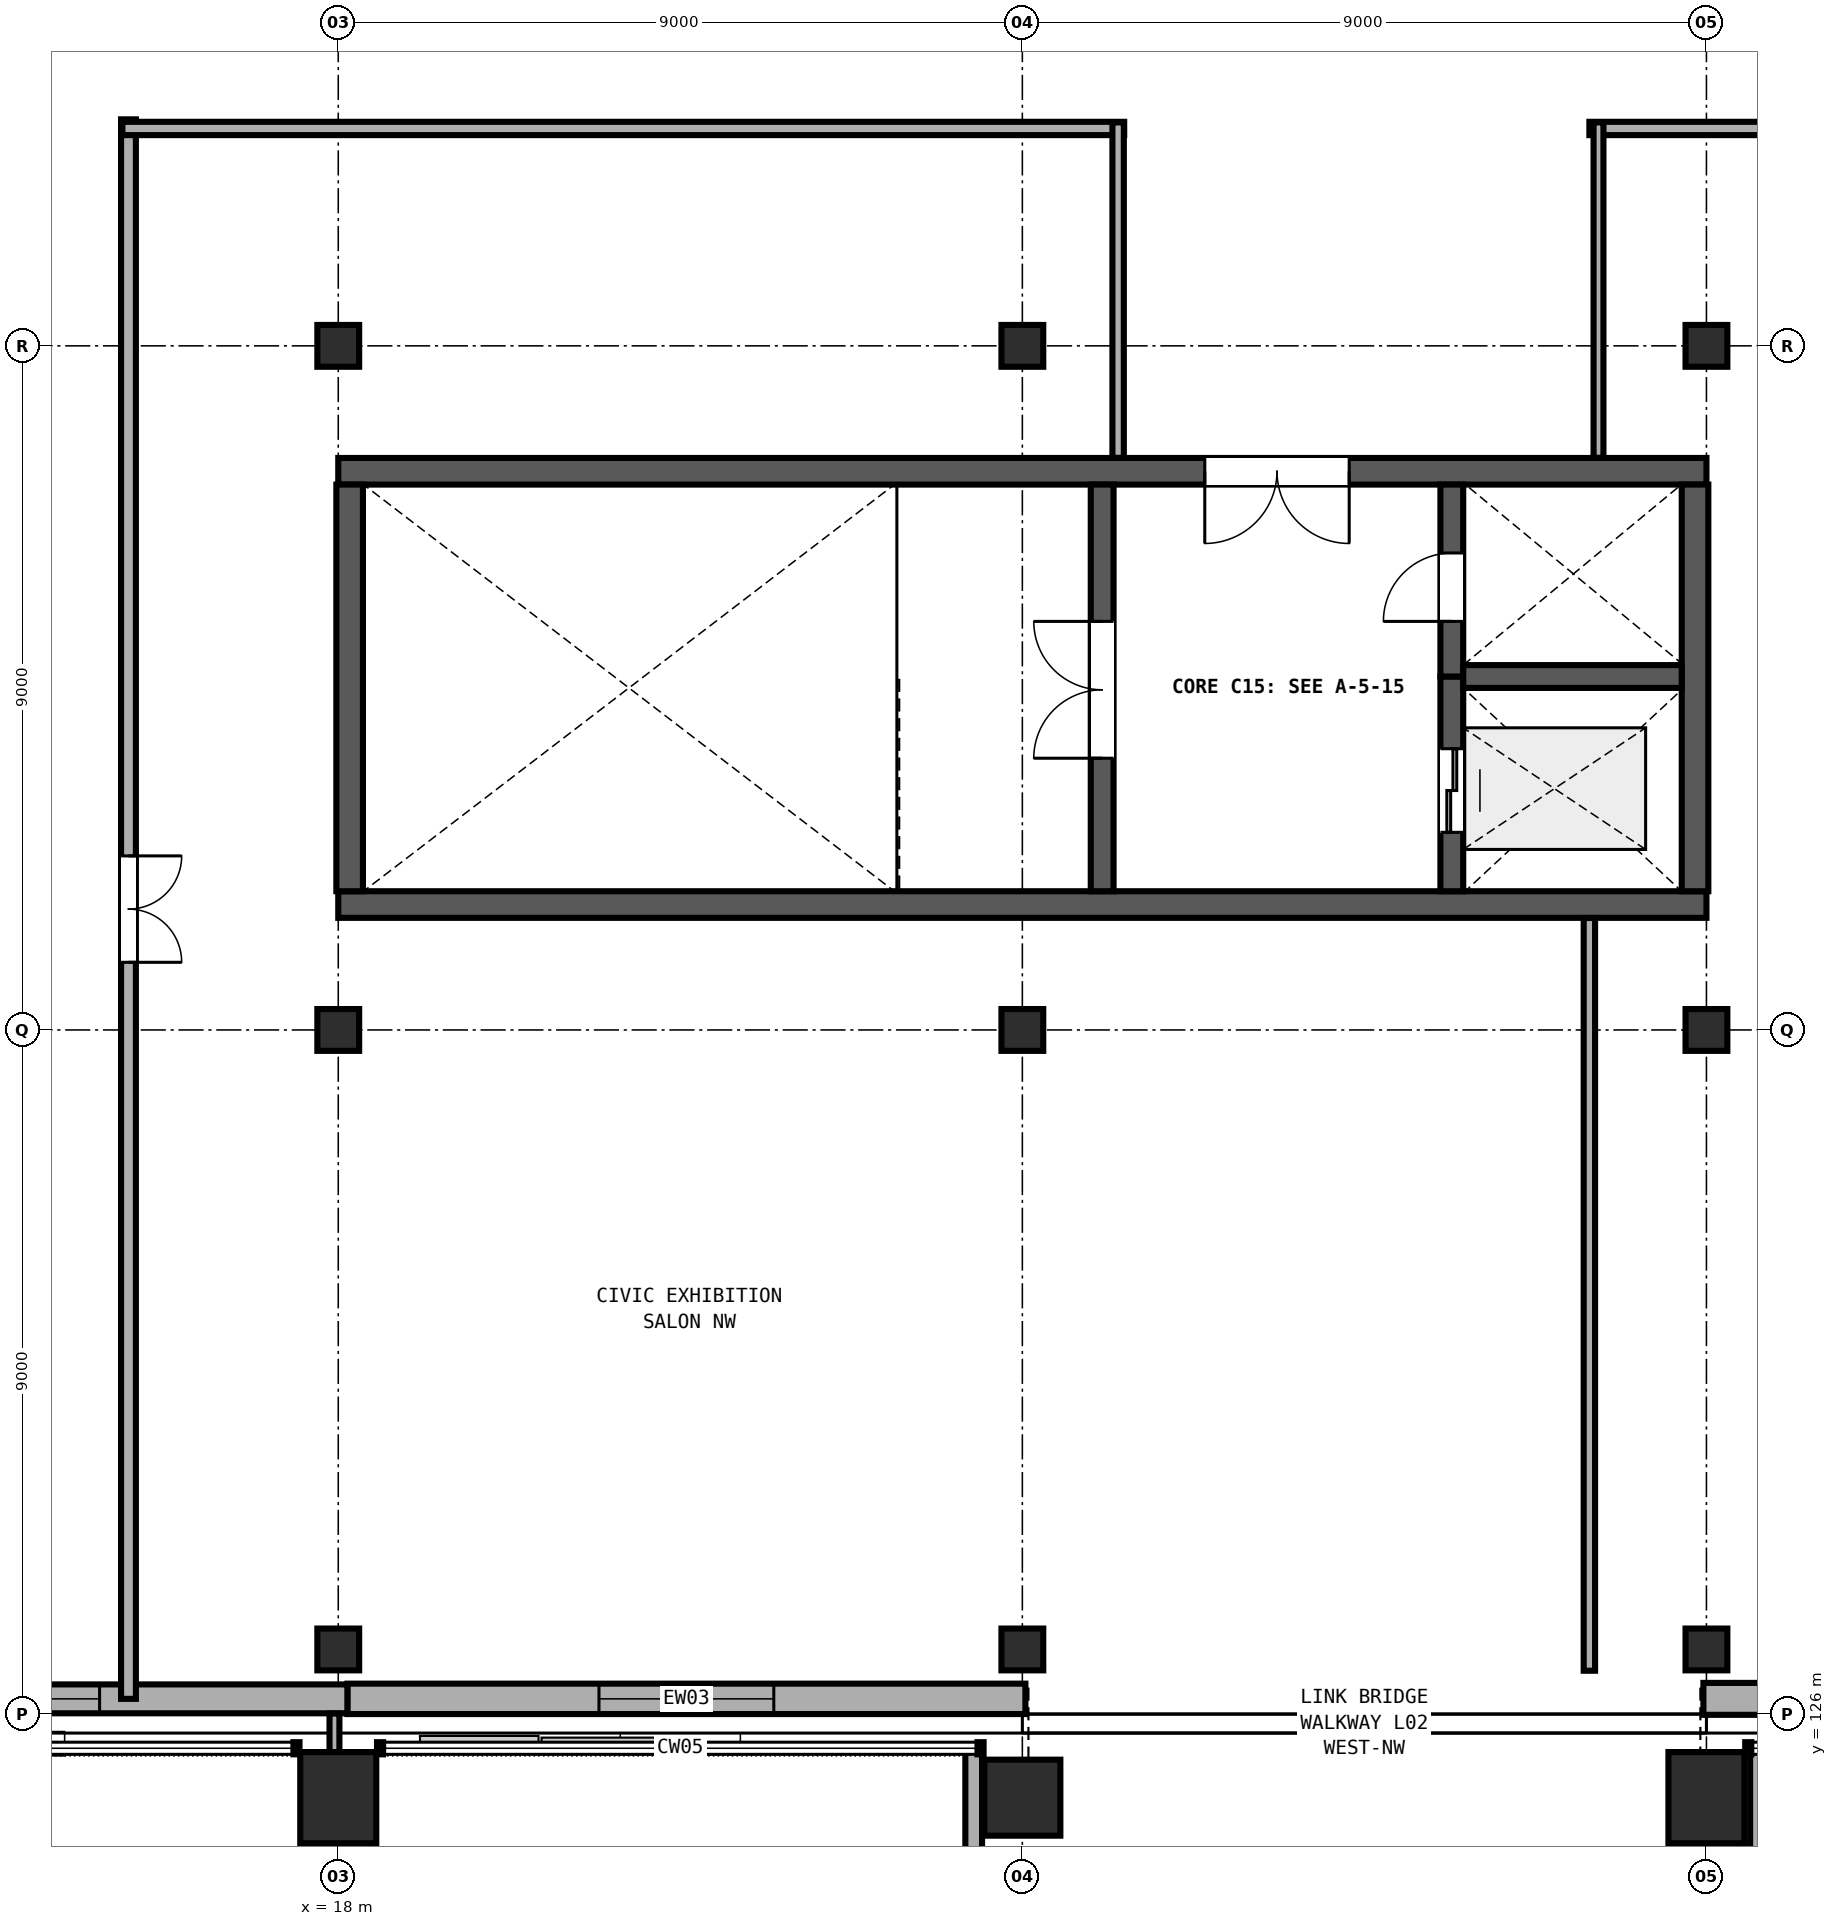
"""IFC4 building model, lengths in metres.
Left out: names, types, materials, properties, quantities, classifications, styles, units other than length and angle.
Written with IfcOpenShell. Run it as: python <this file> out.ifc"""

import sys

from ifc_helpers import new_model, si_unit, direction, frame, frame_2d, origin, origin_2d, place, context, subcontext, project, spatial, rectangle, extrude, element, fill, save


model = new_model("IFC4")
c1 = context("Model", 3, precision=1e-05, world=origin(), true_north=direction((0.0, 1.0)))
c2 = subcontext(c1, "Body", "Model", "MODEL_VIEW")
j1 = project(units=[si_unit("LENGTHUNIT", "METRE"), si_unit("PLANEANGLEUNIT", "RADIAN")], contexts=[c1])
p1 = place(None, origin())
s1 = spatial("IfcSite", under=j1, at=p1, CompositionType="ELEMENT")
p2 = place(p1, origin())
s2 = spatial("IfcBuilding", under=s1, at=p2, CompositionType="ELEMENT")
p3 = place(p2, frame((0.0, 0.0, 9.6)))
s3 = spatial("IfcBuildingStorey", under=s2, at=p3, CompositionType="ELEMENT", Elevation=9.6)
p4 = place(p3, frame((18.0, 124.9, 0.0), z_axis=(0.0, 0.0, 1.0), x_axis=(1.0, 0.0, 0.0)))
e1 = element("IfcColumn", 1, at=p4, inside=s3, PredefinedType="COLUMN", context=c2, shape_type="SweptSolid", body=[
    extrude(rectangle(XDim=1.0, YDim=1.2, at=origin_2d()), origin(), (0.0, 0.0, 1.0), 4.8),
])
p5 = place(p3, frame((27.0, 124.9, 0.0), z_axis=(0.0, 0.0, 1.0), x_axis=(1.0, 0.0, 0.0)))
e2 = element("IfcColumn", 2, at=p5, inside=s3, PredefinedType="COLUMN", context=c2, shape_type="SweptSolid", body=[
    extrude(rectangle(XDim=1.0, YDim=1.0, at=origin_2d()), origin(), (0.0, 0.0, 1.0), 4.8),
])
p6 = place(p3, frame((36.0, 124.9, 0.0), z_axis=(0.0, 0.0, 1.0), x_axis=(1.0, 0.0, 0.0)))
e3 = element("IfcColumn", 3, at=p6, inside=s3, PredefinedType="COLUMN", context=c2, shape_type="SweptSolid", body=[
    extrude(rectangle(XDim=1.0, YDim=1.2, at=origin_2d()), origin(), (0.0, 0.0, 1.0), 4.8),
])
for number, where, z_axis, x_axis in (
    (4, (18.0, 126.85, 0.0), (0.0, 0.0, 1.0), (1.0, 0.0, 0.0)),
    (5, (18.0, 135.0, 0.0), (0.0, 0.0, 1.0), (1.0, 0.0, 0.0)),
    (6, (18.0, 144.0, 0.0), (0.0, 0.0, 1.0), (1.0, 0.0, 0.0)),
    (7, (27.0, 126.85, 0.0), (0.0, 0.0, 1.0), (1.0, 0.0, 0.0)),
    (8, (27.0, 135.0, 0.0), (0.0, 0.0, 1.0), (1.0, 0.0, 0.0)),
    (9, (27.0, 144.0, 0.0), (0.0, 0.0, 1.0), (1.0, 0.0, 0.0)),
    (10, (36.0, 126.85, 0.0), (0.0, 0.0, 1.0), (1.0, 0.0, 0.0)),
    (11, (36.0, 135.0, 0.0), (0.0, 0.0, 1.0), (1.0, 0.0, 0.0)),
    (12, (36.0, 144.0, 0.0), (0.0, 0.0, 1.0), (1.0, 0.0, 0.0)),
):
    element("IfcColumn", number, at=place(p3, frame(where, z_axis=z_axis, x_axis=x_axis)), inside=s3, PredefinedType="COLUMN", context=c2, shape_type="SweptSolid", body=[
        extrude(rectangle(XDim=0.55, YDim=0.55, at=origin_2d()), origin(), (0.0, 0.0, 1.0), 4.8),
    ])
p7 = place(p3, frame((18.0, 136.65, 0.0), z_axis=(0.0, 0.0, 1.0), x_axis=(1.0, 0.0, 0.0)))
e13 = element("IfcWall", 13, at=p7, inside=s3, PredefinedType="SHEAR", context=c2, shape_type="SweptSolid", body=[
    extrude(rectangle(XDim=18.0, YDim=0.35, at=frame_2d((9.0, 0.0))), origin(), (0.0, 0.0, 1.0), 4.555),
])
p8 = place(p3, frame((36.0, 142.35, 0.0), z_axis=(0.0, 0.0, 1.0), x_axis=(-1.0, 0.0, 0.0)))
e14 = element("IfcWall", 14, at=p8, inside=s3, PredefinedType="SHEAR", context=c2, shape_type="SweptSolid", body=[
    extrude(rectangle(XDim=18.0, YDim=0.35, at=frame_2d((9.0, 0.0))), origin(), (0.0, 0.0, 1.0), 4.555),
])
p9 = place(p8, frame((4.7, 0.0, 0.0)))
e15 = element("IfcOpeningElement", 15, at=p9, cuts=e14, PredefinedType="OPENING", context=c2, shape_type="SweptSolid", body=[
    extrude(rectangle(XDim=1.9, YDim=2.25, at=frame_2d((0.95, 1.125))), frame((0.0, 0.185, 0.0), z_axis=(0.0, -1.0, 0.0), x_axis=(1.0, 0.0, 0.0)), (0.0, 0.0, 1.0), 0.37),
])
for number, where, z_axis, x_axis in (
    (16, (18.15, 142.175, 0.0), (0.0, 0.0, 1.0), (0.0, -1.0, 0.0)),
    (17, (35.85, 136.825, 0.0), (0.0, 0.0, 1.0), (0.0, 1.0, 0.0)),
):
    element("IfcWall", number, at=place(p3, frame(where, z_axis=z_axis, x_axis=x_axis)), inside=s3, PredefinedType="SHEAR", context=c2, shape_type="SweptSolid", body=[
        extrude(rectangle(XDim=5.35, YDim=0.35, at=frame_2d((2.675, 0.0))), origin(), (0.0, 0.0, 1.0), 4.555),
    ])
p10 = place(p3, frame((28.05, 136.825, 0.0), z_axis=(0.0, 0.0, 1.0), x_axis=(0.0, 1.0, 0.0)))
e18 = element("IfcWall", 18, at=p10, inside=s3, PredefinedType="SHEAR", context=c2, shape_type="SweptSolid", body=[
    extrude(rectangle(XDim=5.35, YDim=0.3, at=frame_2d((2.675, 0.0))), origin(), (0.0, 0.0, 1.0), 4.555),
])
p11 = place(p10, frame((1.75, 0.0, 0.0)))
e19 = element("IfcOpeningElement", 19, at=p11, cuts=e18, PredefinedType="OPENING", context=c2, shape_type="SweptSolid", body=[
    extrude(rectangle(XDim=1.8, YDim=2.25, at=frame_2d((0.9, 1.125))), frame((0.0, 0.16, 0.0), z_axis=(0.0, -1.0, 0.0), x_axis=(1.0, 0.0, 0.0)), (0.0, 0.0, 1.0), 0.32),
])
p12 = place(p3, frame((32.65, 136.825, 0.0), z_axis=(0.0, 0.0, 1.0), x_axis=(0.0, 1.0, 0.0)))
e20 = element("IfcWall", 20, at=p12, inside=s3, PredefinedType="SHEAR", context=c2, shape_type="SweptSolid", body=[
    extrude(rectangle(XDim=2.825, YDim=0.3, at=frame_2d((1.413, 0.0))), origin(), (0.0, 0.0, 1.0), 4.555),
])
p13 = place(p12, frame((0.775, 0.0, 0.0)))
e21 = element("IfcOpeningElement", 21, at=p13, cuts=e20, PredefinedType="OPENING", context=c2, shape_type="SweptSolid", body=[
    extrude(rectangle(XDim=1.1, YDim=2.1, at=frame_2d((0.55, 1.05))), frame((0.0, 0.16, 0.0), z_axis=(0.0, -1.0, 0.0), x_axis=(1.0, 0.0, 0.0)), (0.0, 0.0, 1.0), 0.32),
])
p14 = place(p3, frame((32.65, 139.65, 0.0), z_axis=(0.0, 0.0, 1.0), x_axis=(0.0, 1.0, 0.0)))
e22 = element("IfcWall", 22, at=p14, inside=s3, PredefinedType="SHEAR", context=c2, shape_type="SweptSolid", body=[
    extrude(rectangle(XDim=2.525, YDim=0.3, at=frame_2d((1.263, 0.0))), origin(), (0.0, 0.0, 1.0), 4.555),
])
p15 = place(p14, frame((0.725, 0.0, 0.0)))
e23 = element("IfcOpeningElement", 23, at=p15, cuts=e22, PredefinedType="OPENING", context=c2, shape_type="SweptSolid", body=[
    extrude(rectangle(XDim=0.9, YDim=2.1, at=frame_2d((0.45, 1.05))), frame((0.0, 0.16, 0.0), z_axis=(0.0, -1.0, 0.0), x_axis=(1.0, 0.0, 0.0)), (0.0, 0.0, 1.0), 0.32),
])
p16 = place(p3, frame((32.8, 139.65, 0.0), z_axis=(0.0, 0.0, 1.0), x_axis=(1.0, 0.0, 0.0)))
e24 = element("IfcWall", 24, at=p16, inside=s3, PredefinedType="SHEAR", context=c2, shape_type="SweptSolid", body=[
    extrude(rectangle(XDim=2.875, YDim=0.3, at=frame_2d((1.438, 0.0))), origin(), (0.0, 0.0, 1.0), 4.555),
])
p17 = place(p3, frame((44.88, 126.2, 0.0), z_axis=(0.0, 0.0, 1.0), x_axis=(-1.0, 0.0, 0.0)))
e25 = element("IfcWall", 25, at=p17, inside=s3, PredefinedType="SOLIDWALL", context=c2, shape_type="SweptSolid", body=[
    extrude(rectangle(XDim=8.92, YDim=0.42, at=frame_2d((4.46, 0.0))), origin(), (0.0, 0.0, 1.0), 3.58),
])
p18 = place(p17, frame((3.36, 0.0, 0.9)))
e26 = element("IfcOpeningElement", 26, at=p18, cuts=e25, PredefinedType="OPENING", context=c2, shape_type="SweptSolid", body=[
    extrude(rectangle(XDim=2.2, YDim=1.95, at=frame_2d((1.1, 0.975))), frame((0.0, 0.22, 0.0), z_axis=(0.0, -1.0, 0.0), x_axis=(1.0, 0.0, 0.0)), (0.0, 0.0, 1.0), 0.44),
])
p19 = place(p3, frame((27.04, 126.2, 0.0), z_axis=(0.0, 0.0, 1.0), x_axis=(-1.0, 0.0, 0.0)))
e27 = element("IfcWall", 27, at=p19, inside=s3, PredefinedType="SOLIDWALL", context=c2, shape_type="SweptSolid", body=[
    extrude(rectangle(XDim=8.92, YDim=0.4, at=frame_2d((4.46, 0.0))), origin(), (0.0, 0.0, 1.0), 3.58),
])
p20 = place(p19, frame((3.31, 0.0, 0.9)))
e28 = element("IfcOpeningElement", 28, at=p20, cuts=e27, PredefinedType="OPENING", context=c2, shape_type="SweptSolid", body=[
    extrude(rectangle(XDim=2.3, YDim=2.0, at=frame_2d((1.15, 1.0))), frame((0.0, 0.21, 0.0), z_axis=(0.0, -1.0, 0.0), x_axis=(1.0, 0.0, 0.0)), (0.0, 0.0, 1.0), 0.42),
])
p21 = place(p3, frame((18.12, 126.2, 0.0), z_axis=(0.0, 0.0, 1.0), x_axis=(-1.0, 0.0, 0.0)))
e29 = element("IfcWall", 29, at=p21, inside=s3, PredefinedType="SOLIDWALL", context=c2, shape_type="SweptSolid", body=[
    extrude(rectangle(XDim=8.92, YDim=0.38, at=frame_2d((4.46, 0.0))), origin(), (0.0, 0.0, 1.0), 3.58),
])
p22 = place(p21, frame((3.26, 0.0, 0.9)))
e30 = element("IfcOpeningElement", 30, at=p22, cuts=e29, PredefinedType="OPENING", context=c2, shape_type="SweptSolid", body=[
    extrude(rectangle(XDim=2.4, YDim=2.05, at=frame_2d((1.2, 1.025))), frame((0.0, 0.2, 0.0), z_axis=(0.0, -1.0, 0.0), x_axis=(1.0, 0.0, 0.0)), (0.0, 0.0, 1.0), 0.4),
])
p23 = place(p3, frame((17.95, 126.007, 0.0), z_axis=(0.0, 0.0, 1.0), x_axis=(0.0, -1.0, 0.0)))
e31 = element("IfcWall", 31, at=p23, inside=s3, PredefinedType="PARTITIONING", context=c2, shape_type="SweptSolid", body=[
    extrude(rectangle(XDim=17.18, YDim=0.13, at=frame_2d((8.59, 0.0))), origin(), (0.0, 0.0, 1.0), 3.56),
])
p24 = place(p3, frame((26.36, 125.51, 0.0), z_axis=(0.0, 0.0, 1.0), x_axis=(0.0, -1.0, 0.0)))
e32 = element("IfcWall", 32, at=p24, inside=s3, PredefinedType="PARTITIONING", context=c2, shape_type="SweptSolid", body=[
    extrude(rectangle(XDim=3.01, YDim=0.22, at=frame_2d((1.505, 0.0))), origin(), (0.0, 0.0, 1.0), 3.56),
])
p25 = place(p3, frame((36.64, 122.5, 0.0), z_axis=(0.0, 0.0, 1.0), x_axis=(0.0, 1.0, 0.0)))
e33 = element("IfcWall", 33, at=p25, inside=s3, PredefinedType="PARTITIONING", context=c2, shape_type="SweptSolid", body=[
    extrude(rectangle(XDim=3.01, YDim=0.13, at=frame_2d((1.505, 0.0))), origin(), (0.0, 0.0, 1.0), 3.56),
])
p26 = place(p3, frame((50.71, 146.86, 0.0), z_axis=(0.0, 0.0, 1.0), x_axis=(-1.0, 0.0, 0.0)))
e34 = element("IfcWall", 34, at=p26, inside=s3, PredefinedType="PARTITIONING", context=c2, shape_type="SweptSolid", body=[
    extrude(rectangle(XDim=16.25, YDim=0.175, at=frame_2d((8.125, 0.0))), origin(), (0.0, 0.0, 1.0), 3.56),
])
p27 = place(p26, frame((7.35, 0.0, 0.0)))
e35 = element("IfcOpeningElement", 35, at=p27, cuts=e34, PredefinedType="OPENING", context=c2, shape_type="SweptSolid", body=[
    extrude(rectangle(XDim=1.55, YDim=2.2, at=frame_2d((0.775, 1.1))), frame((0.0, 0.097, 0.0), z_axis=(0.0, -1.0, 0.0), x_axis=(1.0, 0.0, 0.0)), (0.0, 0.0, 1.0), 0.195),
])
p28 = place(p3, frame((34.46, 126.57, 0.0), z_axis=(0.0, 0.0, 1.0), x_axis=(0.0, 1.0, 0.0)))
e36 = element("IfcWall", 36, at=p28, inside=s3, PredefinedType="PARTITIONING", context=c2, shape_type="SweptSolid", body=[
    extrude(rectangle(XDim=9.903, YDim=0.15, at=frame_2d((4.951, 0.0))), origin(), (0.0, 0.0, 1.0), 3.56),
])
p29 = place(p3, frame((34.58, 142.527, 0.0), z_axis=(0.0, 0.0, 1.0), x_axis=(0.0, 1.0, 0.0)))
e37 = element("IfcWall", 37, at=p29, inside=s3, PredefinedType="PARTITIONING", context=c2, shape_type="SweptSolid", body=[
    extrude(rectangle(XDim=4.413, YDim=0.13, at=frame_2d((2.207, 0.0))), origin(), (0.0, 0.0, 1.0), 3.56),
])
p30 = place(p3, frame((15.24, 146.98, 0.0), z_axis=(0.0, 0.0, 1.0), x_axis=(0.0, -1.0, 0.0)))
e38 = element("IfcWall", 38, at=p30, inside=s3, PredefinedType="PARTITIONING", context=c2, shape_type="SweptSolid", body=[
    extrude(rectangle(XDim=20.78, YDim=0.195, at=frame_2d((10.39, 0.0))), origin(), (0.0, 0.0, 1.0), 3.56),
])
p31 = place(p30, frame((9.69, 0.0, 0.0)))
e39 = element("IfcOpeningElement", 39, at=p31, cuts=e38, PredefinedType="OPENING", context=c2, shape_type="SweptSolid", body=[
    extrude(rectangle(XDim=1.4, YDim=2.15, at=frame_2d((0.7, 1.075))), frame((0.0, 0.107, 0.0), z_axis=(0.0, -1.0, 0.0), x_axis=(1.0, 0.0, 0.0)), (0.0, 0.0, 1.0), 0.215),
])
p32 = place(p3, frame((15.16, 146.86, 0.0), z_axis=(0.0, 0.0, 1.0), x_axis=(1.0, 0.0, 0.0)))
e40 = element("IfcWall", 40, at=p32, inside=s3, PredefinedType="PARTITIONING", context=c2, shape_type="SweptSolid", body=[
    extrude(rectangle(XDim=13.18, YDim=0.175, at=frame_2d((6.59, 0.0))), origin(), (0.0, 0.0, 1.0), 3.56),
])
p33 = place(p3, frame((28.26, 146.94, 0.0), z_axis=(0.0, 0.0, 1.0), x_axis=(0.0, -1.0, 0.0)))
e41 = element("IfcWall", 41, at=p33, inside=s3, PredefinedType="PARTITIONING", context=c2, shape_type="SweptSolid", body=[
    extrude(rectangle(XDim=4.413, YDim=0.15, at=frame_2d((2.207, 0.0))), origin(), (0.0, 0.0, 1.0), 3.56),
])
p34 = place(p20, origin())
e42 = element("IfcWindow", 42, at=p34, inside=s3, PartitioningType="DOUBLE_PANEL_VERTICAL", PredefinedType="WINDOW", context=c2, shape_type="SweptSolid", body=[
    extrude(rectangle(XDim=2.3, YDim=2.0, at=frame_2d((1.15, 1.0))), frame((0.0, 0.03, 0.0), z_axis=(0.0, -1.0, 0.0), x_axis=(1.0, 0.0, 0.0)), (0.0, 0.0, 1.0), 0.06),
])
fill(e28, e42)
p35 = place(p22, origin())
e43 = element("IfcWindow", 43, at=p35, inside=s3, PartitioningType="DOUBLE_PANEL_VERTICAL", PredefinedType="WINDOW", context=c2, shape_type="SweptSolid", body=[
    extrude(rectangle(XDim=2.4, YDim=2.05, at=frame_2d((1.2, 1.025))), frame((0.0, 0.03, 0.0), z_axis=(0.0, -1.0, 0.0), x_axis=(1.0, 0.0, 0.0)), (0.0, 0.0, 1.0), 0.06),
])
fill(e30, e43)
p36 = place(p11, origin())
e44 = element("IfcDoor", 44, at=p36, inside=s3, OperationType="DOUBLE_DOOR_SINGLE_SWING", PredefinedType="DOOR", context=c2, shape_type="SweptSolid", body=[
    extrude(rectangle(XDim=1.8, YDim=2.25, at=frame_2d((0.9, 1.125))), frame((0.0, 0.025, 0.0), z_axis=(0.0, -1.0, 0.0), x_axis=(1.0, 0.0, 0.0)), (0.0, 0.0, 1.0), 0.05),
])
fill(e19, e44)
p37 = place(p15, origin())
e45 = element("IfcDoor", 45, at=p37, inside=s3, OperationType="SINGLE_SWING_LEFT", PredefinedType="DOOR", context=c2, shape_type="SweptSolid", body=[
    extrude(rectangle(XDim=0.9, YDim=2.1, at=frame_2d((0.45, 1.05))), frame((0.0, 0.025, 0.0), z_axis=(0.0, -1.0, 0.0), x_axis=(1.0, 0.0, 0.0)), (0.0, 0.0, 1.0), 0.05),
])
fill(e23, e45)
p38 = place(p13, origin())
e46 = element("IfcDoor", 46, at=p38, inside=s3, OperationType="DOUBLE_DOOR_SLIDING", PredefinedType="DOOR", context=c2, shape_type="SweptSolid", body=[
    extrude(rectangle(XDim=1.1, YDim=2.1, at=frame_2d((0.55, 1.05))), frame((0.0, 0.025, 0.0), z_axis=(0.0, -1.0, 0.0), x_axis=(1.0, 0.0, 0.0)), (0.0, 0.0, 1.0), 0.05),
])
fill(e21, e46)
p39 = place(p9, origin())
e47 = element("IfcDoor", 47, at=p39, inside=s3, OperationType="DOUBLE_DOOR_SINGLE_SWING", PredefinedType="DOOR", context=c2, shape_type="SweptSolid", body=[
    extrude(rectangle(XDim=1.9, YDim=2.25, at=frame_2d((0.95, 1.125))), frame((0.0, 0.025, 0.0), z_axis=(0.0, -1.0, 0.0), x_axis=(1.0, 0.0, 0.0)), (0.0, 0.0, 1.0), 0.05),
])
fill(e15, e47)
p40 = place(p31, origin())
e48 = element("IfcDoor", 48, at=p40, inside=s3, OperationType="DOUBLE_DOOR_SINGLE_SWING", PredefinedType="DOOR", context=c2, shape_type="SweptSolid", body=[
    extrude(rectangle(XDim=1.4, YDim=2.15, at=frame_2d((0.7, 1.075))), frame((0.0, 0.025, 0.0), z_axis=(0.0, -1.0, 0.0), x_axis=(1.0, 0.0, 0.0)), (0.0, 0.0, 1.0), 0.05),
])
fill(e39, e48)
save(model, sys.argv[1])
